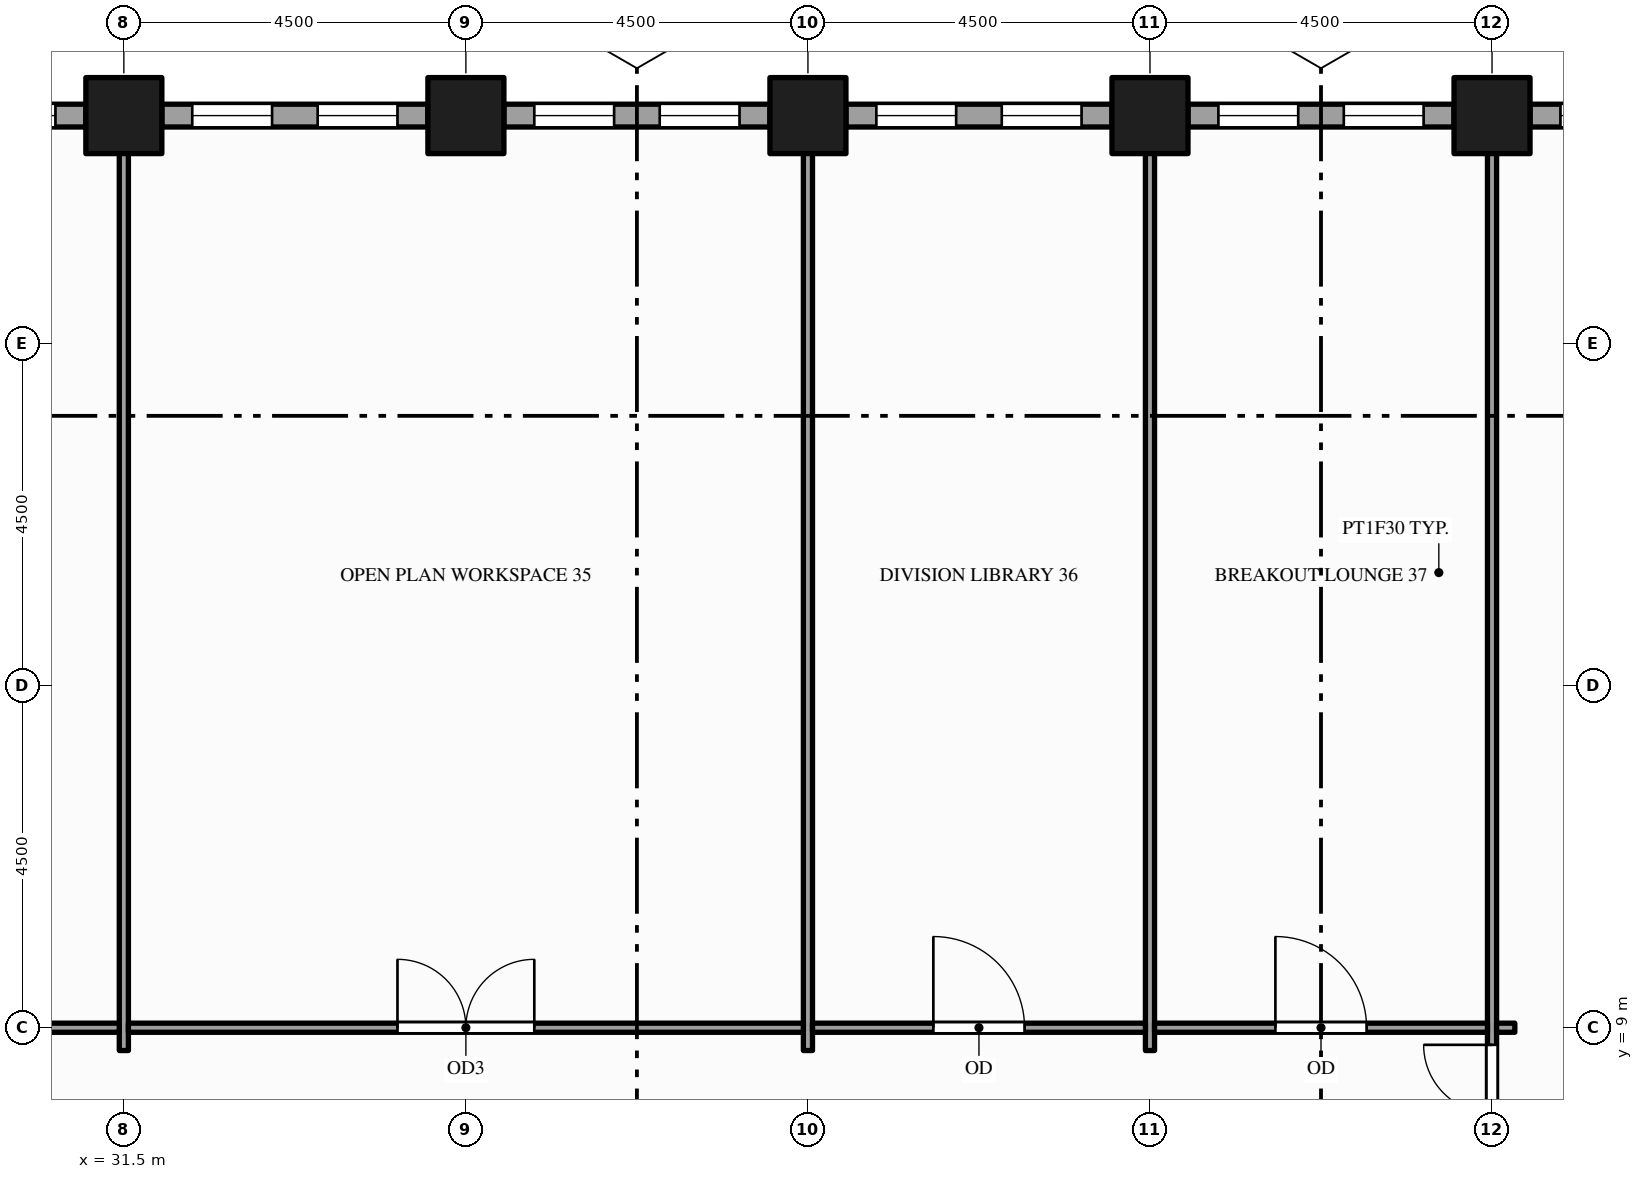
"""IFC4 building model, lengths in metres.
Left out: names, types, materials, properties, quantities, classifications, styles, units other than length and angle.
Written with IfcOpenShell. Run it as: python <this file> out.ifc"""

import sys

from ifc_helpers import new_model, si_unit, direction, frame, frame_2d, origin, origin_2d, place, context, subcontext, project, spatial, rectangle, hollow_rectangle, extrude, element, fill, save


model = new_model("IFC4")
c1 = context("Model", 3, precision=1e-05, world=origin(), true_north=direction((0.0, 1.0)))
c2 = subcontext(c1, "Body", "Model", "MODEL_VIEW")
j1 = project(units=[si_unit("LENGTHUNIT", "METRE"), si_unit("PLANEANGLEUNIT", "RADIAN")], contexts=[c1])
p1 = place(None, origin())
s1 = spatial("IfcSite", under=j1, at=p1, CompositionType="ELEMENT")
p2 = place(p1, origin())
s2 = spatial("IfcBuilding", under=s1, at=p2, CompositionType="ELEMENT")
p3 = place(p2, frame((0.0, 0.0, 107.0)))
s3 = spatial("IfcBuildingStorey", under=s2, at=p3, CompositionType="ELEMENT", Elevation=107.0)
for number, where, z_axis, x_axis in (
    (1, (31.5, 21.0, -0.15), (0.0, 0.0, 1.0), (1.0, 0.0, 0.0)),
    (2, (36.0, 21.0, -0.15), (0.0, 0.0, 1.0), (1.0, 0.0, 0.0)),
    (3, (40.5, 21.0, -0.15), (0.0, 0.0, 1.0), (1.0, 0.0, 0.0)),
    (4, (45.0, 21.0, -0.15), (0.0, 0.0, 1.0), (1.0, 0.0, 0.0)),
    (5, (49.5, 21.0, -0.15), (0.0, 0.0, 1.0), (1.0, 0.0, 0.0)),
):
    element("IfcColumn", number, at=place(p3, frame(where, z_axis=z_axis, x_axis=x_axis)), inside=s3, PredefinedType="COLUMN", context=c2, shape_type="SweptSolid", body=[
        extrude(hollow_rectangle(XDim=1.0, YDim=1.0, WallThickness=0.05, at=origin_2d()), origin(), (0.0, 0.0, 1.0), 4.0),
    ])
p4 = place(p3, frame((54.0, 21.0, 0.0), z_axis=(0.0, 0.0, 1.0), x_axis=(-1.0, 0.0, 0.0)))
e6 = element("IfcWall", 6, at=p4, inside=s3, PredefinedType="STANDARD", context=c2, shape_type="SweptSolid", body=[
    extrude(rectangle(XDim=4.0, YDim=0.3, at=frame_2d((2.0, 0.0))), origin(), (0.0, 0.0, 1.0), 3.154),
])
p5 = place(p4, frame((0.4, 0.0, 0.9)))
e7 = element("IfcOpeningElement", 7, at=p5, cuts=e6, PredefinedType="OPENING", context=c2, shape_type="SweptSolid", body=[
    extrude(rectangle(XDim=1.55, YDim=2.0, at=frame_2d((0.775, 1.0))), frame((0.0, 0.16, 0.0), z_axis=(0.0, -1.0, 0.0), x_axis=(1.0, 0.0, 0.0)), (0.0, 0.0, 1.0), 0.32),
])
p6 = place(p4, frame((2.55, 0.0, 0.9)))
e8 = element("IfcOpeningElement", 8, at=p6, cuts=e6, PredefinedType="OPENING", context=c2, shape_type="SweptSolid", body=[
    extrude(rectangle(XDim=1.05, YDim=2.0, at=frame_2d((0.525, 1.0))), frame((0.0, 0.16, 0.0), z_axis=(0.0, -1.0, 0.0), x_axis=(1.0, 0.0, 0.0)), (0.0, 0.0, 1.0), 0.32),
])
p7 = place(p3, frame((49.0, 21.0, 0.0), z_axis=(0.0, 0.0, 1.0), x_axis=(-1.0, 0.0, 0.0)))
e9 = element("IfcWall", 9, at=p7, inside=s3, PredefinedType="STANDARD", context=c2, shape_type="SweptSolid", body=[
    extrude(rectangle(XDim=3.5, YDim=0.3, at=frame_2d((1.75, 0.0))), origin(), (0.0, 0.0, 1.0), 3.154),
])
p8 = place(p7, frame((0.4, 0.0, 0.9)))
e10 = element("IfcOpeningElement", 10, at=p8, cuts=e9, PredefinedType="OPENING", context=c2, shape_type="SweptSolid", body=[
    extrude(rectangle(XDim=1.05, YDim=2.0, at=frame_2d((0.525, 1.0))), frame((0.0, 0.16, 0.0), z_axis=(0.0, -1.0, 0.0), x_axis=(1.0, 0.0, 0.0)), (0.0, 0.0, 1.0), 0.32),
])
p9 = place(p7, frame((2.05, 0.0, 0.9)))
e11 = element("IfcOpeningElement", 11, at=p9, cuts=e9, PredefinedType="OPENING", context=c2, shape_type="SweptSolid", body=[
    extrude(rectangle(XDim=1.05, YDim=2.0, at=frame_2d((0.525, 1.0))), frame((0.0, 0.16, 0.0), z_axis=(0.0, -1.0, 0.0), x_axis=(1.0, 0.0, 0.0)), (0.0, 0.0, 1.0), 0.32),
])
p10 = place(p3, frame((44.5, 21.0, 0.0), z_axis=(0.0, 0.0, 1.0), x_axis=(-1.0, 0.0, 0.0)))
e12 = element("IfcWall", 12, at=p10, inside=s3, PredefinedType="STANDARD", context=c2, shape_type="SweptSolid", body=[
    extrude(rectangle(XDim=3.5, YDim=0.3, at=frame_2d((1.75, 0.0))), origin(), (0.0, 0.0, 1.0), 3.154),
])
p11 = place(p10, frame((0.4, 0.0, 0.9)))
e13 = element("IfcOpeningElement", 13, at=p11, cuts=e12, PredefinedType="OPENING", context=c2, shape_type="SweptSolid", body=[
    extrude(rectangle(XDim=1.05, YDim=2.0, at=frame_2d((0.525, 1.0))), frame((0.0, 0.16, 0.0), z_axis=(0.0, -1.0, 0.0), x_axis=(1.0, 0.0, 0.0)), (0.0, 0.0, 1.0), 0.32),
])
p12 = place(p10, frame((2.05, 0.0, 0.9)))
e14 = element("IfcOpeningElement", 14, at=p12, cuts=e12, PredefinedType="OPENING", context=c2, shape_type="SweptSolid", body=[
    extrude(rectangle(XDim=1.05, YDim=2.0, at=frame_2d((0.525, 1.0))), frame((0.0, 0.16, 0.0), z_axis=(0.0, -1.0, 0.0), x_axis=(1.0, 0.0, 0.0)), (0.0, 0.0, 1.0), 0.32),
])
p13 = place(p3, frame((40.0, 21.0, 0.0), z_axis=(0.0, 0.0, 1.0), x_axis=(-1.0, 0.0, 0.0)))
e15 = element("IfcWall", 15, at=p13, inside=s3, PredefinedType="STANDARD", context=c2, shape_type="SweptSolid", body=[
    extrude(rectangle(XDim=3.5, YDim=0.3, at=frame_2d((1.75, 0.0))), origin(), (0.0, 0.0, 1.0), 3.154),
])
p14 = place(p13, frame((0.4, 0.0, 0.9)))
e16 = element("IfcOpeningElement", 16, at=p14, cuts=e15, PredefinedType="OPENING", context=c2, shape_type="SweptSolid", body=[
    extrude(rectangle(XDim=1.05, YDim=2.0, at=frame_2d((0.525, 1.0))), frame((0.0, 0.16, 0.0), z_axis=(0.0, -1.0, 0.0), x_axis=(1.0, 0.0, 0.0)), (0.0, 0.0, 1.0), 0.32),
])
p15 = place(p13, frame((2.05, 0.0, 0.9)))
e17 = element("IfcOpeningElement", 17, at=p15, cuts=e15, PredefinedType="OPENING", context=c2, shape_type="SweptSolid", body=[
    extrude(rectangle(XDim=1.05, YDim=2.0, at=frame_2d((0.525, 1.0))), frame((0.0, 0.16, 0.0), z_axis=(0.0, -1.0, 0.0), x_axis=(1.0, 0.0, 0.0)), (0.0, 0.0, 1.0), 0.32),
])
p16 = place(p3, frame((35.5, 21.0, 0.0), z_axis=(0.0, 0.0, 1.0), x_axis=(-1.0, 0.0, 0.0)))
e18 = element("IfcWall", 18, at=p16, inside=s3, PredefinedType="STANDARD", context=c2, shape_type="SweptSolid", body=[
    extrude(rectangle(XDim=3.5, YDim=0.3, at=frame_2d((1.75, 0.0))), origin(), (0.0, 0.0, 1.0), 3.154),
])
p17 = place(p16, frame((0.4, 0.0, 0.9)))
e19 = element("IfcOpeningElement", 19, at=p17, cuts=e18, PredefinedType="OPENING", context=c2, shape_type="SweptSolid", body=[
    extrude(rectangle(XDim=1.05, YDim=2.0, at=frame_2d((0.525, 1.0))), frame((0.0, 0.16, 0.0), z_axis=(0.0, -1.0, 0.0), x_axis=(1.0, 0.0, 0.0)), (0.0, 0.0, 1.0), 0.32),
])
p18 = place(p16, frame((2.05, 0.0, 0.9)))
e20 = element("IfcOpeningElement", 20, at=p18, cuts=e18, PredefinedType="OPENING", context=c2, shape_type="SweptSolid", body=[
    extrude(rectangle(XDim=1.05, YDim=2.0, at=frame_2d((0.525, 1.0))), frame((0.0, 0.16, 0.0), z_axis=(0.0, -1.0, 0.0), x_axis=(1.0, 0.0, 0.0)), (0.0, 0.0, 1.0), 0.32),
])
p19 = place(p3, frame((31.0, 21.0, 0.0), z_axis=(0.0, 0.0, 1.0), x_axis=(-1.0, 0.0, 0.0)))
e21 = element("IfcWall", 21, at=p19, inside=s3, PredefinedType="STANDARD", context=c2, shape_type="SweptSolid", body=[
    extrude(rectangle(XDim=2.0, YDim=0.3, at=frame_2d((1.0, 0.0))), origin(), (0.0, 0.0, 1.0), 3.154),
])
p20 = place(p19, frame((0.4, 0.0, 0.9)))
e22 = element("IfcOpeningElement", 22, at=p20, cuts=e21, PredefinedType="OPENING", context=c2, shape_type="SweptSolid", body=[
    extrude(rectangle(XDim=1.2, YDim=2.0, at=frame_2d((0.6, 1.0))), frame((0.0, 0.16, 0.0), z_axis=(0.0, -1.0, 0.0), x_axis=(1.0, 0.0, 0.0)), (0.0, 0.0, 1.0), 0.32),
])
for number, where, z_axis, x_axis in (
    (23, (31.5, 8.7, 0.0), (0.0, 0.0, 1.0), (0.0, 1.0, 0.0)),
    (24, (40.5, 8.7, 0.0), (0.0, 0.0, 1.0), (0.0, 1.0, 0.0)),
    (25, (45.0, 8.7, 0.0), (0.0, 0.0, 1.0), (0.0, 1.0, 0.0)),
):
    element("IfcWall", number, at=place(p3, frame(where, z_axis=z_axis, x_axis=x_axis)), inside=s3, PredefinedType="PARTITIONING", context=c2, shape_type="SweptSolid", body=[
        extrude(rectangle(XDim=12.15, YDim=0.12, at=frame_2d((6.075, 0.0))), origin(), (0.0, 0.0, 1.0), 2.938),
    ])
p21 = place(p3, frame((49.5, -1.35, 0.0), z_axis=(0.0, 0.0, 1.0), x_axis=(0.0, 1.0, 0.0)))
e26 = element("IfcWall", 26, at=p21, inside=s3, PredefinedType="PARTITIONING", context=c2, shape_type="SweptSolid", body=[
    extrude(rectangle(XDim=22.2, YDim=0.12, at=frame_2d((11.1, 0.0))), origin(), (0.0, 0.0, 1.0), 2.938),
])
p22 = place(p21, frame((8.325, 0.0, 0.0)))
e27 = element("IfcOpeningElement", 27, at=p22, cuts=e26, PredefinedType="OPENING", context=c2, shape_type="SweptSolid", body=[
    extrude(rectangle(XDim=1.8, YDim=2.1, at=frame_2d((0.9, 1.05))), frame((0.0, 0.07, 0.0), z_axis=(0.0, -1.0, 0.0), x_axis=(1.0, 0.0, 0.0)), (0.0, 0.0, 1.0), 0.14),
])
p23 = place(p21, frame((0.85, 0.0, 0.0)))
e28 = element("IfcOpeningElement", 28, at=p23, cuts=e26, PredefinedType="OPENING", context=c2, shape_type="SweptSolid", body=[
    extrude(rectangle(XDim=0.9, YDim=2.1, at=frame_2d((0.45, 1.05))), frame((0.0, 0.07, 0.0), z_axis=(0.0, -1.0, 0.0), x_axis=(1.0, 0.0, 0.0)), (0.0, 0.0, 1.0), 0.14),
])
p24 = place(p21, frame((3.525, 0.0, 0.0)))
e29 = element("IfcOpeningElement", 29, at=p24, cuts=e26, PredefinedType="OPENING", context=c2, shape_type="SweptSolid", body=[
    extrude(rectangle(XDim=0.9, YDim=2.1, at=frame_2d((0.45, 1.05))), frame((0.0, 0.07, 0.0), z_axis=(0.0, -1.0, 0.0), x_axis=(1.0, 0.0, 0.0)), (0.0, 0.0, 1.0), 0.14),
])
p25 = place(p21, frame((6.1, 0.0, 0.0)))
e30 = element("IfcOpeningElement", 30, at=p25, cuts=e26, PredefinedType="OPENING", context=c2, shape_type="SweptSolid", body=[
    extrude(rectangle(XDim=1.0, YDim=2.1, at=frame_2d((0.5, 1.05))), frame((0.0, 0.07, 0.0), z_axis=(0.0, -1.0, 0.0), x_axis=(1.0, 0.0, 0.0)), (0.0, 0.0, 1.0), 0.14),
])
p26 = place(p3, frame((11.31, 9.0, 0.0), z_axis=(0.0, 0.0, 1.0), x_axis=(1.0, 0.0, 0.0)))
e31 = element("IfcWall", 31, at=p26, inside=s3, PredefinedType="PARTITIONING", context=c2, shape_type="SweptSolid", body=[
    extrude(rectangle(XDim=20.13, YDim=0.12, at=frame_2d((10.065, 0.0))), origin(), (0.0, 0.0, 1.0), 2.76),
])
p27 = place(p26, frame((3.54, 0.0, 0.0)))
e32 = element("IfcOpeningElement", 32, at=p27, cuts=e31, PredefinedType="OPENING", context=c2, shape_type="SweptSolid", body=[
    extrude(rectangle(XDim=1.8, YDim=2.1, at=frame_2d((0.9, 1.05))), frame((0.0, 0.07, 0.0), z_axis=(0.0, -1.0, 0.0), x_axis=(1.0, 0.0, 0.0)), (0.0, 0.0, 1.0), 0.14),
])
p28 = place(p3, frame((31.56, 9.0, 0.0), z_axis=(0.0, 0.0, 1.0), x_axis=(1.0, 0.0, 0.0)))
e33 = element("IfcWall", 33, at=p28, inside=s3, PredefinedType="PARTITIONING", context=c2, shape_type="SweptSolid", body=[
    extrude(rectangle(XDim=8.88, YDim=0.12, at=frame_2d((4.44, 0.0))), origin(), (0.0, 0.0, 1.0), 2.938),
])
p29 = place(p28, frame((3.54, 0.0, 0.0)))
e34 = element("IfcOpeningElement", 34, at=p29, cuts=e33, PredefinedType="OPENING", context=c2, shape_type="SweptSolid", body=[
    extrude(rectangle(XDim=1.8, YDim=2.1, at=frame_2d((0.9, 1.05))), frame((0.0, 0.07, 0.0), z_axis=(0.0, -1.0, 0.0), x_axis=(1.0, 0.0, 0.0)), (0.0, 0.0, 1.0), 0.14),
])
p30 = place(p3, frame((40.56, 9.0, 0.0), z_axis=(0.0, 0.0, 1.0), x_axis=(1.0, 0.0, 0.0)))
e35 = element("IfcWall", 35, at=p30, inside=s3, PredefinedType="PARTITIONING", context=c2, shape_type="SweptSolid", body=[
    extrude(rectangle(XDim=4.38, YDim=0.12, at=frame_2d((2.19, 0.0))), origin(), (0.0, 0.0, 1.0), 2.938),
])
p31 = place(p30, frame((1.59, 0.0, 0.0)))
e36 = element("IfcOpeningElement", 36, at=p31, cuts=e35, PredefinedType="OPENING", context=c2, shape_type="SweptSolid", body=[
    extrude(rectangle(XDim=1.2, YDim=2.1, at=frame_2d((0.6, 1.05))), frame((0.0, 0.07, 0.0), z_axis=(0.0, -1.0, 0.0), x_axis=(1.0, 0.0, 0.0)), (0.0, 0.0, 1.0), 0.14),
])
p32 = place(p3, frame((45.06, 9.0, 0.0), z_axis=(0.0, 0.0, 1.0), x_axis=(1.0, 0.0, 0.0)))
e37 = element("IfcWall", 37, at=p32, inside=s3, PredefinedType="PARTITIONING", context=c2, shape_type="SweptSolid", body=[
    extrude(rectangle(XDim=4.38, YDim=0.12, at=frame_2d((2.19, 0.0))), origin(), (0.0, 0.0, 1.0), 2.938),
])
p33 = place(p32, frame((1.59, 0.0, 0.0)))
e38 = element("IfcOpeningElement", 38, at=p33, cuts=e37, PredefinedType="OPENING", context=c2, shape_type="SweptSolid", body=[
    extrude(rectangle(XDim=1.2, YDim=2.1, at=frame_2d((0.6, 1.05))), frame((0.0, 0.07, 0.0), z_axis=(0.0, -1.0, 0.0), x_axis=(1.0, 0.0, 0.0)), (0.0, 0.0, 1.0), 0.14),
])
p34 = place(p3, frame((49.56, 9.0, 0.0), z_axis=(0.0, 0.0, 1.0), x_axis=(1.0, 0.0, 0.0)))
e39 = element("IfcWall", 39, at=p34, inside=s3, PredefinedType="PARTITIONING", context=c2, shape_type="SweptSolid", body=[
    extrude(rectangle(XDim=0.24, YDim=0.12, at=frame_2d((0.12, 0.0))), origin(), (0.0, 0.0, 1.0), 2.938),
])
p35 = place(p6, origin())
e40 = element("IfcWindow", 40, at=p35, inside=s3, PartitioningType="SINGLE_PANEL", PredefinedType="WINDOW", context=c2, shape_type="SweptSolid", body=[
    extrude(rectangle(XDim=1.05, YDim=2.0, at=frame_2d((0.525, 1.0))), frame((0.0, 0.03, 0.0), z_axis=(0.0, -1.0, 0.0), x_axis=(1.0, 0.0, 0.0)), (0.0, 0.0, 1.0), 0.06),
])
fill(e8, e40)
p36 = place(p8, origin())
e41 = element("IfcWindow", 41, at=p36, inside=s3, PartitioningType="SINGLE_PANEL", PredefinedType="WINDOW", context=c2, shape_type="SweptSolid", body=[
    extrude(rectangle(XDim=1.05, YDim=2.0, at=frame_2d((0.525, 1.0))), frame((0.0, 0.03, 0.0), z_axis=(0.0, -1.0, 0.0), x_axis=(1.0, 0.0, 0.0)), (0.0, 0.0, 1.0), 0.06),
])
fill(e10, e41)
p37 = place(p9, origin())
e42 = element("IfcWindow", 42, at=p37, inside=s3, PartitioningType="SINGLE_PANEL", PredefinedType="WINDOW", context=c2, shape_type="SweptSolid", body=[
    extrude(rectangle(XDim=1.05, YDim=2.0, at=frame_2d((0.525, 1.0))), frame((0.0, 0.03, 0.0), z_axis=(0.0, -1.0, 0.0), x_axis=(1.0, 0.0, 0.0)), (0.0, 0.0, 1.0), 0.06),
])
fill(e11, e42)
p38 = place(p11, origin())
e43 = element("IfcWindow", 43, at=p38, inside=s3, PartitioningType="SINGLE_PANEL", PredefinedType="WINDOW", context=c2, shape_type="SweptSolid", body=[
    extrude(rectangle(XDim=1.05, YDim=2.0, at=frame_2d((0.525, 1.0))), frame((0.0, 0.03, 0.0), z_axis=(0.0, -1.0, 0.0), x_axis=(1.0, 0.0, 0.0)), (0.0, 0.0, 1.0), 0.06),
])
fill(e13, e43)
p39 = place(p12, origin())
e44 = element("IfcWindow", 44, at=p39, inside=s3, PartitioningType="SINGLE_PANEL", PredefinedType="WINDOW", context=c2, shape_type="SweptSolid", body=[
    extrude(rectangle(XDim=1.05, YDim=2.0, at=frame_2d((0.525, 1.0))), frame((0.0, 0.03, 0.0), z_axis=(0.0, -1.0, 0.0), x_axis=(1.0, 0.0, 0.0)), (0.0, 0.0, 1.0), 0.06),
])
fill(e14, e44)
p40 = place(p14, origin())
e45 = element("IfcWindow", 45, at=p40, inside=s3, PartitioningType="SINGLE_PANEL", PredefinedType="WINDOW", context=c2, shape_type="SweptSolid", body=[
    extrude(rectangle(XDim=1.05, YDim=2.0, at=frame_2d((0.525, 1.0))), frame((0.0, 0.03, 0.0), z_axis=(0.0, -1.0, 0.0), x_axis=(1.0, 0.0, 0.0)), (0.0, 0.0, 1.0), 0.06),
])
fill(e16, e45)
p41 = place(p15, origin())
e46 = element("IfcWindow", 46, at=p41, inside=s3, PartitioningType="SINGLE_PANEL", PredefinedType="WINDOW", context=c2, shape_type="SweptSolid", body=[
    extrude(rectangle(XDim=1.05, YDim=2.0, at=frame_2d((0.525, 1.0))), frame((0.0, 0.03, 0.0), z_axis=(0.0, -1.0, 0.0), x_axis=(1.0, 0.0, 0.0)), (0.0, 0.0, 1.0), 0.06),
])
fill(e17, e46)
p42 = place(p17, origin())
e47 = element("IfcWindow", 47, at=p42, inside=s3, PartitioningType="SINGLE_PANEL", PredefinedType="WINDOW", context=c2, shape_type="SweptSolid", body=[
    extrude(rectangle(XDim=1.05, YDim=2.0, at=frame_2d((0.525, 1.0))), frame((0.0, 0.03, 0.0), z_axis=(0.0, -1.0, 0.0), x_axis=(1.0, 0.0, 0.0)), (0.0, 0.0, 1.0), 0.06),
])
fill(e19, e47)
p43 = place(p18, origin())
e48 = element("IfcWindow", 48, at=p43, inside=s3, PartitioningType="SINGLE_PANEL", PredefinedType="WINDOW", context=c2, shape_type="SweptSolid", body=[
    extrude(rectangle(XDim=1.05, YDim=2.0, at=frame_2d((0.525, 1.0))), frame((0.0, 0.03, 0.0), z_axis=(0.0, -1.0, 0.0), x_axis=(1.0, 0.0, 0.0)), (0.0, 0.0, 1.0), 0.06),
])
fill(e20, e48)
p44 = place(p20, origin())
e49 = element("IfcWindow", 49, at=p44, inside=s3, PartitioningType="SINGLE_PANEL", PredefinedType="WINDOW", context=c2, shape_type="SweptSolid", body=[
    extrude(rectangle(XDim=1.2, YDim=2.0, at=frame_2d((0.6, 1.0))), frame((0.0, 0.03, 0.0), z_axis=(0.0, -1.0, 0.0), x_axis=(1.0, 0.0, 0.0)), (0.0, 0.0, 1.0), 0.06),
])
fill(e22, e49)
p45 = place(p22, origin())
e50 = element("IfcDoor", 50, at=p45, inside=s3, OperationType="DOUBLE_DOOR_SINGLE_SWING", PredefinedType="DOOR", context=c2, shape_type="SweptSolid", body=[
    extrude(rectangle(XDim=1.8, YDim=2.1, at=frame_2d((0.9, 1.05))), frame((0.0, 0.025, 0.0), z_axis=(0.0, -1.0, 0.0), x_axis=(1.0, 0.0, 0.0)), (0.0, 0.0, 1.0), 0.05),
])
fill(e27, e50)
p46 = place(p29, origin())
e51 = element("IfcDoor", 51, at=p46, inside=s3, OperationType="DOUBLE_DOOR_SINGLE_SWING", PredefinedType="DOOR", context=c2, shape_type="SweptSolid", body=[
    extrude(rectangle(XDim=1.8, YDim=2.1, at=frame_2d((0.9, 1.05))), frame((0.0, 0.025, 0.0), z_axis=(0.0, -1.0, 0.0), x_axis=(1.0, 0.0, 0.0)), (0.0, 0.0, 1.0), 0.05),
])
fill(e34, e51)
p47 = place(p31, origin())
e52 = element("IfcDoor", 52, at=p47, inside=s3, OperationType="SINGLE_SWING_LEFT", PredefinedType="DOOR", context=c2, shape_type="SweptSolid", body=[
    extrude(rectangle(XDim=1.2, YDim=2.1, at=frame_2d((0.6, 1.05))), frame((0.0, 0.025, 0.0), z_axis=(0.0, -1.0, 0.0), x_axis=(1.0, 0.0, 0.0)), (0.0, 0.0, 1.0), 0.05),
])
fill(e36, e52)
p48 = place(p33, origin())
e53 = element("IfcDoor", 53, at=p48, inside=s3, OperationType="SINGLE_SWING_LEFT", PredefinedType="DOOR", context=c2, shape_type="SweptSolid", body=[
    extrude(rectangle(XDim=1.2, YDim=2.1, at=frame_2d((0.6, 1.05))), frame((0.0, 0.025, 0.0), z_axis=(0.0, -1.0, 0.0), x_axis=(1.0, 0.0, 0.0)), (0.0, 0.0, 1.0), 0.05),
])
fill(e38, e53)
save(model, sys.argv[1])
